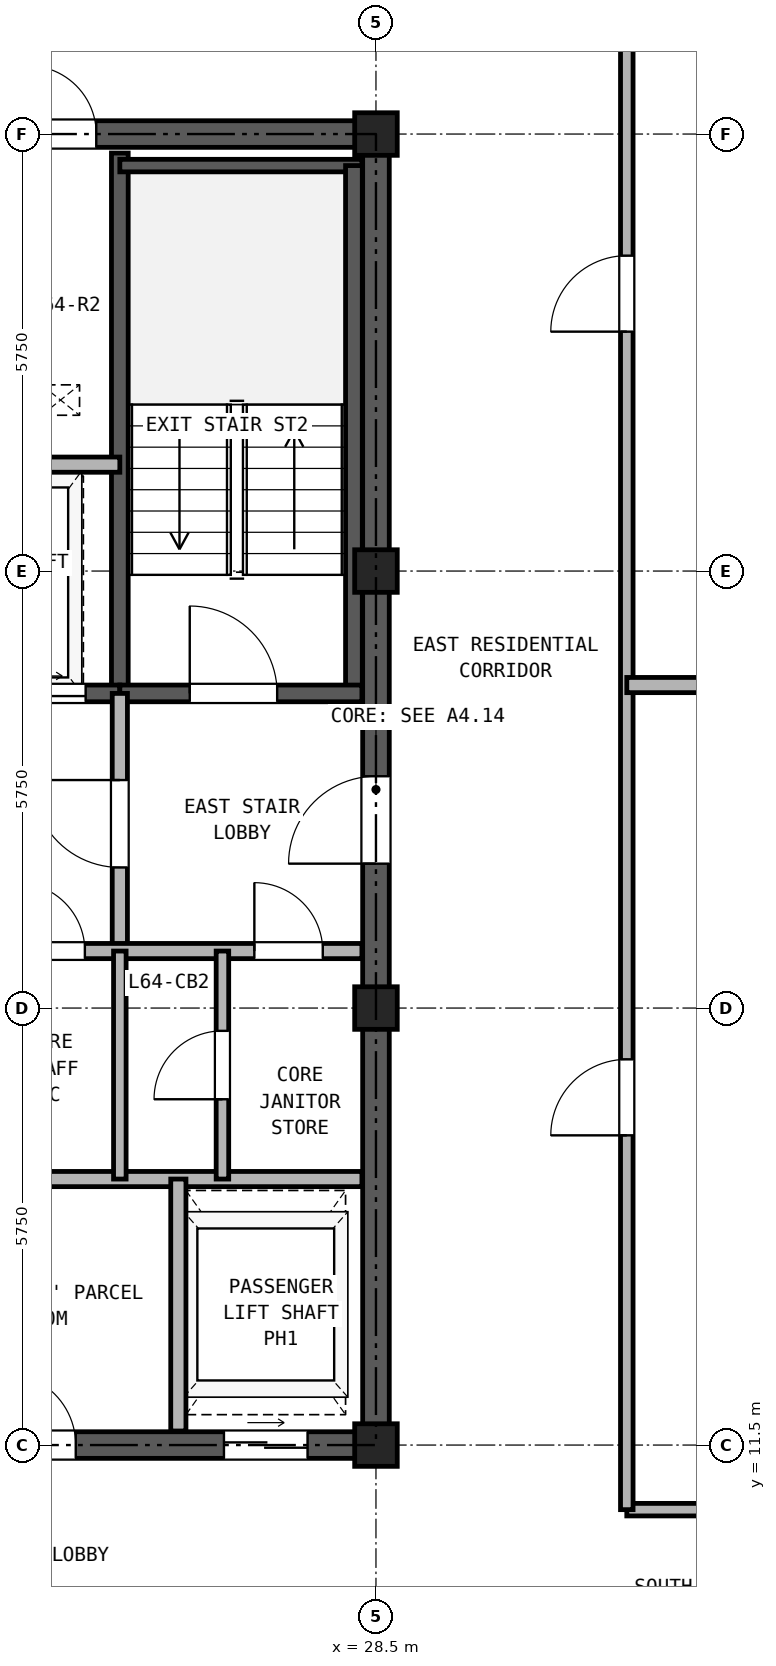
"""IFC4 building model, lengths in metres.
Left out: names, types, materials, properties, quantities, classifications, styles, units other than length and angle.
Written with IfcOpenShell. Run it as: python <this file> out.ifc"""

import sys

from ifc_helpers import new_model, si_unit, direction, frame, frame_2d, origin, origin_2d, place, context, subcontext, project, spatial, rectangle, hollow_rectangle, extrude, source, transform, mapped, element, fill, save


model = new_model("IFC4")
c1 = context("Model", 3, precision=1e-05, world=origin(), true_north=direction((0.0, 1.0)))
c2 = subcontext(c1, "Body", "Model", "MODEL_VIEW")
j1 = project(units=[si_unit("LENGTHUNIT", "METRE"), si_unit("PLANEANGLEUNIT", "RADIAN")], contexts=[c1])
p1 = place(None, origin())
s1 = spatial("IfcSite", under=j1, at=p1, CompositionType="ELEMENT")
p2 = place(p1, origin())
s2 = spatial("IfcBuilding", under=s1, at=p2, CompositionType="ELEMENT")
p3 = place(p2, frame((0.0, 0.0, 226.5)))
s3 = spatial("IfcBuildingStorey", under=s2, at=p3, CompositionType="ELEMENT", Elevation=226.5)
m1 = source(origin(), c2, "Body", "SweptSolid", [
    extrude(hollow_rectangle(XDim=0.56, YDim=0.56, WallThickness=0.03, at=origin_2d()), origin(), (0.0, 0.0, 1.0), 2.98),
])
for number, where, z_axis, x_axis in (
    (1, (28.5, 11.5, 0.0), (0.0, 0.0, 1.0), (1.0, 0.0, 0.0)),
    (2, (28.5, 17.25, 0.0), (0.0, 0.0, 1.0), (1.0, 0.0, 0.0)),
    (3, (28.5, 23.0, 0.0), (0.0, 0.0, 1.0), (1.0, 0.0, 0.0)),
    (4, (28.5, 28.75, 0.0), (0.0, 0.0, 1.0), (1.0, 0.0, 0.0)),
):
    element("IfcColumn", number, at=place(p3, frame(where, z_axis=z_axis, x_axis=x_axis)), inside=s3, PredefinedType="COLUMN", context=c2, shape_type="MappedRepresentation", body=[
        mapped(m1, transform((0.0, 0.0, 0.0), x_axis=(1.0, 0.0, 0.0), y_axis=(0.0, 1.0, 0.0), z_axis=(0.0, 0.0, 1.0), scale=1.0)),
    ])
p4 = place(p3, frame((18.325, 11.5, 0.0), z_axis=(0.0, 0.0, 1.0), x_axis=(1.0, 0.0, 0.0)))
e5 = element("IfcWall", 5, at=p4, inside=s3, PredefinedType="SHEAR", context=c2, shape_type="SweptSolid", body=[
    extrude(rectangle(XDim=10.35, YDim=0.35, at=frame_2d((5.175, 0.0))), origin(), (0.0, 0.0, 1.0), 2.98),
])
p5 = place(p4, frame((1.775, 0.0, 0.0)))
e6 = element("IfcOpeningElement", 6, at=p5, cuts=e5, PredefinedType="OPENING", context=c2, shape_type="SweptSolid", body=[
    extrude(rectangle(XDim=0.95, YDim=2.15, at=frame_2d((0.475, 1.075))), frame((0.0, 0.185, 0.0), z_axis=(0.0, -1.0, 0.0), x_axis=(1.0, 0.0, 0.0)), (0.0, 0.0, 1.0), 0.37),
])
p6 = place(p4, frame((5.275, 0.0, 0.0)))
e7 = element("IfcOpeningElement", 7, at=p6, cuts=e5, PredefinedType="OPENING", context=c2, shape_type="SweptSolid", body=[
    extrude(rectangle(XDim=0.95, YDim=2.15, at=frame_2d((0.475, 1.075))), frame((0.0, 0.185, 0.0), z_axis=(0.0, -1.0, 0.0), x_axis=(1.0, 0.0, 0.0)), (0.0, 0.0, 1.0), 0.37),
])
p7 = place(p4, frame((8.175, 0.0, 0.0)))
e8 = element("IfcOpeningElement", 8, at=p7, cuts=e5, PredefinedType="OPENING", context=c2, shape_type="SweptSolid", body=[
    extrude(rectangle(XDim=1.1, YDim=2.25, at=frame_2d((0.55, 1.125))), frame((0.0, 0.185, 0.0), z_axis=(0.0, -1.0, 0.0), x_axis=(1.0, 0.0, 0.0)), (0.0, 0.0, 1.0), 0.37),
])
p8 = place(p3, frame((18.325, 28.75, 0.0), z_axis=(0.0, 0.0, 1.0), x_axis=(1.0, 0.0, 0.0)))
e9 = element("IfcWall", 9, at=p8, inside=s3, PredefinedType="SHEAR", context=c2, shape_type="SweptSolid", body=[
    extrude(rectangle(XDim=10.35, YDim=0.35, at=frame_2d((5.175, 0.0))), origin(), (0.0, 0.0, 1.0), 2.98),
])
p9 = place(p8, frame((4.055, 0.0, 0.0)))
e10 = element("IfcOpeningElement", 10, at=p9, cuts=e9, PredefinedType="OPENING", context=c2, shape_type="SweptSolid", body=[
    extrude(rectangle(XDim=0.9, YDim=2.05, at=frame_2d((0.45, 1.025))), frame((0.0, 0.185, 0.0), z_axis=(0.0, -1.0, 0.0), x_axis=(1.0, 0.0, 0.0)), (0.0, 0.0, 1.0), 0.37),
])
p10 = place(p8, frame((5.595, 0.0, 0.0)))
e11 = element("IfcOpeningElement", 11, at=p10, cuts=e9, PredefinedType="OPENING", context=c2, shape_type="SweptSolid", body=[
    extrude(rectangle(XDim=0.9, YDim=2.05, at=frame_2d((0.45, 1.025))), frame((0.0, 0.185, 0.0), z_axis=(0.0, -1.0, 0.0), x_axis=(1.0, 0.0, 0.0)), (0.0, 0.0, 1.0), 0.37),
])
p11 = place(p3, frame((28.5, 11.675, 0.0), z_axis=(0.0, 0.0, 1.0), x_axis=(0.0, 1.0, 0.0)))
e12 = element("IfcWall", 12, at=p11, inside=s3, PredefinedType="SHEAR", context=c2, shape_type="SweptSolid", body=[
    extrude(rectangle(XDim=16.9, YDim=0.35, at=frame_2d((8.45, 0.0))), origin(), (0.0, 0.0, 1.0), 2.98),
])
p12 = place(p11, frame((7.475, 0.0, 0.0)))
e13 = element("IfcOpeningElement", 13, at=p12, cuts=e12, PredefinedType="OPENING", context=c2, shape_type="SweptSolid", body=[
    extrude(rectangle(XDim=1.15, YDim=2.2, at=frame_2d((0.575, 1.1))), frame((0.0, 0.185, 0.0), z_axis=(0.0, -1.0, 0.0), x_axis=(1.0, 0.0, 0.0)), (0.0, 0.0, 1.0), 0.37),
])
p13 = place(p3, frame((25.13, 21.39, 0.0), z_axis=(0.0, 0.0, 1.0), x_axis=(0.0, 1.0, 0.0)))
e14 = element("IfcWall", 14, at=p13, inside=s3, PredefinedType="SOLIDWALL", context=c2, shape_type="SweptSolid", body=[
    extrude(rectangle(XDim=7.11, YDim=0.22, at=frame_2d((3.555, 0.0))), origin(), (0.0, 0.0, 1.0), 2.98),
])
p14 = place(p3, frame((25.13, 28.335, 0.0), z_axis=(0.0, 0.0, 1.0), x_axis=(1.0, 0.0, 0.0)))
e15 = element("IfcWall", 15, at=p14, inside=s3, PredefinedType="PARTITIONING", context=c2, shape_type="SweptSolid", body=[
    extrude(rectangle(XDim=3.185, YDim=0.165, at=frame_2d((1.593, 0.0))), origin(), (0.0, 0.0, 1.0), 2.98),
])
p15 = place(p3, frame((28.21, 21.39, 0.0), z_axis=(0.0, 0.0, 1.0), x_axis=(0.0, 1.0, 0.0)))
e16 = element("IfcWall", 16, at=p15, inside=s3, PredefinedType="SOLIDWALL", context=c2, shape_type="SweptSolid", body=[
    extrude(rectangle(XDim=6.945, YDim=0.22, at=frame_2d((3.473, 0.0))), origin(), (0.0, 0.0, 1.0), 2.98),
])
p16 = place(p3, frame((18.685, 21.39, 0.0), z_axis=(0.0, 0.0, 1.0), x_axis=(1.0, 0.0, 0.0)))
e17 = element("IfcWall", 17, at=p16, inside=s3, PredefinedType="SOLIDWALL", context=c2, shape_type="SweptSolid", body=[
    extrude(rectangle(XDim=6.445, YDim=0.22, at=frame_2d((3.222, 0.0))), origin(), (0.0, 0.0, 1.0), 2.98),
])
p17 = place(p16, frame((1.165, 0.0, 0.0)))
e18 = element("IfcOpeningElement", 18, at=p17, cuts=e17, PredefinedType="OPENING", context=c2, shape_type="SweptSolid", body=[
    extrude(rectangle(XDim=1.15, YDim=2.2, at=frame_2d((0.575, 1.1))), frame((0.0, 0.12, 0.0), z_axis=(0.0, -1.0, 0.0), x_axis=(1.0, 0.0, 0.0)), (0.0, 0.0, 1.0), 0.24),
])
p18 = place(p16, frame((4.895, 0.0, 0.0)))
e19 = element("IfcOpeningElement", 19, at=p18, cuts=e17, PredefinedType="OPENING", context=c2, shape_type="SweptSolid", body=[
    extrude(rectangle(XDim=1.1, YDim=2.25, at=frame_2d((0.55, 1.125))), frame((0.0, 0.12, 0.0), z_axis=(0.0, -1.0, 0.0), x_axis=(1.0, 0.0, 0.0)), (0.0, 0.0, 1.0), 0.24),
])
p19 = place(p3, frame((25.13, 21.39, 0.0), z_axis=(0.0, 0.0, 1.0), x_axis=(1.0, 0.0, 0.0)))
e20 = element("IfcWall", 20, at=p19, inside=s3, PredefinedType="SOLIDWALL", context=c2, shape_type="SweptSolid", body=[
    extrude(rectangle(XDim=3.185, YDim=0.22, at=frame_2d((1.593, 0.0))), origin(), (0.0, 0.0, 1.0), 2.98),
])
p20 = place(p19, frame((0.92, 0.0, 0.0)))
e21 = element("IfcOpeningElement", 21, at=p20, cuts=e20, PredefinedType="OPENING", context=c2, shape_type="SweptSolid", body=[
    extrude(rectangle(XDim=1.15, YDim=2.2, at=frame_2d((0.575, 1.1))), frame((0.0, 0.12, 0.0), z_axis=(0.0, -1.0, 0.0), x_axis=(1.0, 0.0, 0.0)), (0.0, 0.0, 1.0), 0.24),
])
p21 = place(p3, frame((22.11, 24.4, 0.0), z_axis=(0.0, 0.0, 1.0), x_axis=(1.0, 0.0, 0.0)))
e22 = element("IfcWall", 22, at=p21, inside=s3, PredefinedType="PARTITIONING", context=c2, shape_type="SweptSolid", body=[
    extrude(rectangle(XDim=3.02, YDim=0.2, at=frame_2d((1.51, 0.0))), origin(), (0.0, 0.0, 1.0), 2.98),
])
p22 = place(p3, frame((25.13, 18.0, 0.0), z_axis=(0.0, 0.0, 1.0), x_axis=(0.0, 1.0, 0.0)))
e23 = element("IfcWall", 23, at=p22, inside=s3, PredefinedType="PARTITIONING", context=c2, shape_type="SweptSolid", body=[
    extrude(rectangle(XDim=3.39, YDim=0.2, at=frame_2d((1.695, 0.0))), origin(), (0.0, 0.0, 1.0), 2.98),
])
p23 = place(p22, frame((1.1, 0.0, 0.0)))
e24 = element("IfcOpeningElement", 24, at=p23, cuts=e23, PredefinedType="OPENING", context=c2, shape_type="SweptSolid", body=[
    extrude(rectangle(XDim=1.15, YDim=2.2, at=frame_2d((0.575, 1.1))), frame((0.0, 0.11, 0.0), z_axis=(0.0, -1.0, 0.0), x_axis=(1.0, 0.0, 0.0)), (0.0, 0.0, 1.0), 0.22),
])
p24 = place(p3, frame((18.685, 18.0, 0.0), z_axis=(0.0, 0.0, 1.0), x_axis=(1.0, 0.0, 0.0)))
e25 = element("IfcWall", 25, at=p24, inside=s3, PredefinedType="PARTITIONING", context=c2, shape_type="SweptSolid", body=[
    extrude(rectangle(XDim=9.63, YDim=0.2, at=frame_2d((4.815, 0.0))), origin(), (0.0, 0.0, 1.0), 2.98),
])
p25 = place(p24, frame((0.565, 0.0, 0.0)))
e26 = element("IfcOpeningElement", 26, at=p25, cuts=e25, PredefinedType="OPENING", context=c2, shape_type="SweptSolid", body=[
    extrude(rectangle(XDim=1.3, YDim=2.3, at=frame_2d((0.65, 1.15))), frame((0.0, 0.11, 0.0), z_axis=(0.0, -1.0, 0.0), x_axis=(1.0, 0.0, 0.0)), (0.0, 0.0, 1.0), 0.22),
])
p26 = place(p24, frame((2.665, 0.0, 0.0)))
e27 = element("IfcOpeningElement", 27, at=p26, cuts=e25, PredefinedType="OPENING", context=c2, shape_type="SweptSolid", body=[
    extrude(rectangle(XDim=1.3, YDim=2.3, at=frame_2d((0.65, 1.15))), frame((0.0, 0.11, 0.0), z_axis=(0.0, -1.0, 0.0), x_axis=(1.0, 0.0, 0.0)), (0.0, 0.0, 1.0), 0.22),
])
p27 = place(p24, frame((5.085, 0.0, 0.0)))
e28 = element("IfcOpeningElement", 28, at=p27, cuts=e25, PredefinedType="OPENING", context=c2, shape_type="SweptSolid", body=[
    extrude(rectangle(XDim=0.9, YDim=2.05, at=frame_2d((0.45, 1.025))), frame((0.0, 0.11, 0.0), z_axis=(0.0, -1.0, 0.0), x_axis=(1.0, 0.0, 0.0)), (0.0, 0.0, 1.0), 0.22),
])
p28 = place(p24, frame((8.215, 0.0, 0.0)))
e29 = element("IfcOpeningElement", 29, at=p28, cuts=e25, PredefinedType="OPENING", context=c2, shape_type="SweptSolid", body=[
    extrude(rectangle(XDim=0.9, YDim=2.05, at=frame_2d((0.45, 1.025))), frame((0.0, 0.11, 0.0), z_axis=(0.0, -1.0, 0.0), x_axis=(1.0, 0.0, 0.0)), (0.0, 0.0, 1.0), 0.22),
])
p29 = place(p3, frame((18.685, 15.0, 0.0), z_axis=(0.0, 0.0, 1.0), x_axis=(1.0, 0.0, 0.0)))
e30 = element("IfcWall", 30, at=p29, inside=s3, PredefinedType="PARTITIONING", context=c2, shape_type="SweptSolid", body=[
    extrude(rectangle(XDim=9.63, YDim=0.2, at=frame_2d((4.815, 0.0))), origin(), (0.0, 0.0, 1.0), 2.98),
])
p30 = place(p3, frame((25.13, 15.0, 0.0), z_axis=(0.0, 0.0, 1.0), x_axis=(0.0, 1.0, 0.0)))
e31 = element("IfcWall", 31, at=p30, inside=s3, PredefinedType="PARTITIONING", context=c2, shape_type="SweptSolid", body=[
    extrude(rectangle(XDim=3.0, YDim=0.165, at=frame_2d((1.5, 0.0))), origin(), (0.0, 0.0, 1.0), 2.98),
])
p31 = place(p3, frame((26.48, 15.0, 0.0), z_axis=(0.0, 0.0, 1.0), x_axis=(0.0, 1.0, 0.0)))
e32 = element("IfcWall", 32, at=p31, inside=s3, PredefinedType="PARTITIONING", context=c2, shape_type="SweptSolid", body=[
    extrude(rectangle(XDim=3.0, YDim=0.165, at=frame_2d((1.5, 0.0))), origin(), (0.0, 0.0, 1.0), 2.98),
])
p32 = place(p31, frame((1.05, 0.0, 0.0)))
e33 = element("IfcOpeningElement", 33, at=p32, cuts=e32, PredefinedType="OPENING", context=c2, shape_type="SweptSolid", body=[
    extrude(rectangle(XDim=0.9, YDim=2.05, at=frame_2d((0.45, 1.025))), frame((0.0, 0.093, 0.0), z_axis=(0.0, -1.0, 0.0), x_axis=(1.0, 0.0, 0.0)), (0.0, 0.0, 1.0), 0.185),
])
p33 = place(p3, frame((25.9, 11.685, 0.0), z_axis=(0.0, 0.0, 1.0), x_axis=(0.0, 1.0, 0.0)))
e34 = element("IfcWall", 34, at=p33, inside=s3, PredefinedType="PARTITIONING", context=c2, shape_type="SweptSolid", body=[
    extrude(rectangle(XDim=3.315, YDim=0.2, at=frame_2d((1.657, 0.0))), origin(), (0.0, 0.0, 1.0), 2.98),
])
p34 = place(p3, frame((31.8, 10.65, 0.0), z_axis=(0.0, 0.0, 1.0), x_axis=(1.0, 0.0, 0.0)))
e35 = element("IfcWall", 35, at=p34, inside=s3, PredefinedType="PARTITIONING", context=c2, shape_type="SweptSolid", body=[
    extrude(rectangle(XDim=6.4, YDim=0.165, at=frame_2d((3.2, 0.0))), origin(), (0.0, 0.0, 1.0), 2.98),
])
p35 = place(p3, frame((31.8, 10.65, 0.0), z_axis=(0.0, 0.0, 1.0), x_axis=(0.0, 1.0, 0.0)))
e36 = element("IfcWall", 36, at=p35, inside=s3, PredefinedType="PARTITIONING", context=c2, shape_type="SweptSolid", body=[
    extrude(rectangle(XDim=24.49, YDim=0.165, at=frame_2d((12.245, 0.0))), origin(), (0.0, 0.0, 1.0), 2.98),
])
p36 = place(p35, frame((4.925, 0.0, 0.0)))
e37 = element("IfcOpeningElement", 37, at=p36, cuts=e36, PredefinedType="OPENING", context=c2, shape_type="SweptSolid", body=[
    extrude(rectangle(XDim=1.0, YDim=2.15, at=frame_2d((0.5, 1.075))), frame((0.0, 0.093, 0.0), z_axis=(0.0, -1.0, 0.0), x_axis=(1.0, 0.0, 0.0)), (0.0, 0.0, 1.0), 0.185),
])
p37 = place(p35, frame((15.5, 0.0, 0.0)))
e38 = element("IfcOpeningElement", 38, at=p37, cuts=e36, PredefinedType="OPENING", context=c2, shape_type="SweptSolid", body=[
    extrude(rectangle(XDim=1.0, YDim=2.15, at=frame_2d((0.5, 1.075))), frame((0.0, 0.093, 0.0), z_axis=(0.0, -1.0, 0.0), x_axis=(1.0, 0.0, 0.0)), (0.0, 0.0, 1.0), 0.185),
])
p38 = place(p3, frame((31.8, 21.5, 0.0), z_axis=(0.0, 0.0, 1.0), x_axis=(1.0, 0.0, 0.0)))
e39 = element("IfcWall", 39, at=p38, inside=s3, PredefinedType="PARTITIONING", context=c2, shape_type="SweptSolid", body=[
    extrude(rectangle(XDim=9.84, YDim=0.2, at=frame_2d((4.92, 0.0))), origin(), (0.0, 0.0, 1.0), 2.98),
])
p39 = place(p20, frame((1.15, 0.0, 0.0), z_axis=(0.0, 0.0, 1.0), x_axis=(-1.0, 0.0, 0.0)))
e40 = element("IfcDoor", 40, at=p39, inside=s3, OperationType="SINGLE_SWING_LEFT", PredefinedType="DOOR", context=c2, shape_type="SweptSolid", body=[
    extrude(rectangle(XDim=1.15, YDim=2.2, at=frame_2d((0.575, 1.1))), frame((0.0, 0.025, 0.0), z_axis=(0.0, -1.0, 0.0), x_axis=(1.0, 0.0, 0.0)), (0.0, 0.0, 1.0), 0.05),
])
fill(e21, e40)
p40 = place(p18, frame((1.1, 0.0, 0.0), z_axis=(0.0, 0.0, 1.0), x_axis=(-1.0, 0.0, 0.0)))
e41 = element("IfcDoor", 41, at=p40, inside=s3, OperationType="DOUBLE_DOOR_SLIDING", PredefinedType="DOOR", context=c2, shape_type="SweptSolid", body=[
    extrude(rectangle(XDim=1.1, YDim=2.25, at=frame_2d((0.55, 1.125))), frame((0.0, 0.025, 0.0), z_axis=(0.0, -1.0, 0.0), x_axis=(1.0, 0.0, 0.0)), (0.0, 0.0, 1.0), 0.05),
])
fill(e19, e41)
p41 = place(p23, origin())
e42 = element("IfcDoor", 42, at=p41, inside=s3, OperationType="SINGLE_SWING_RIGHT", PredefinedType="DOOR", context=c2, shape_type="SweptSolid", body=[
    extrude(rectangle(XDim=1.15, YDim=2.2, at=frame_2d((0.575, 1.1))), frame((0.0, 0.025, 0.0), z_axis=(0.0, -1.0, 0.0), x_axis=(1.0, 0.0, 0.0)), (0.0, 0.0, 1.0), 0.05),
])
fill(e24, e42)
p42 = place(p27, frame((0.9, 0.0, 0.0), z_axis=(0.0, 0.0, 1.0), x_axis=(-1.0, 0.0, 0.0)))
e43 = element("IfcDoor", 43, at=p42, inside=s3, OperationType="SINGLE_SWING_LEFT", PredefinedType="DOOR", context=c2, shape_type="SweptSolid", body=[
    extrude(rectangle(XDim=0.9, YDim=2.05, at=frame_2d((0.45, 1.025))), frame((0.0, 0.025, 0.0), z_axis=(0.0, -1.0, 0.0), x_axis=(1.0, 0.0, 0.0)), (0.0, 0.0, 1.0), 0.05),
])
fill(e28, e43)
p43 = place(p32, origin())
e44 = element("IfcDoor", 44, at=p43, inside=s3, OperationType="SINGLE_SWING_LEFT", PredefinedType="DOOR", context=c2, shape_type="SweptSolid", body=[
    extrude(rectangle(XDim=0.9, YDim=2.05, at=frame_2d((0.45, 1.025))), frame((0.0, 0.025, 0.0), z_axis=(0.0, -1.0, 0.0), x_axis=(1.0, 0.0, 0.0)), (0.0, 0.0, 1.0), 0.05),
])
fill(e33, e44)
p44 = place(p28, frame((0.9, 0.0, 0.0), z_axis=(0.0, 0.0, 1.0), x_axis=(-1.0, 0.0, 0.0)))
e45 = element("IfcDoor", 45, at=p44, inside=s3, OperationType="SINGLE_SWING_LEFT", PredefinedType="DOOR", context=c2, shape_type="SweptSolid", body=[
    extrude(rectangle(XDim=0.9, YDim=2.05, at=frame_2d((0.45, 1.025))), frame((0.0, 0.025, 0.0), z_axis=(0.0, -1.0, 0.0), x_axis=(1.0, 0.0, 0.0)), (0.0, 0.0, 1.0), 0.05),
])
fill(e29, e45)
p45 = place(p12, origin())
e46 = element("IfcDoor", 46, at=p45, inside=s3, OperationType="SINGLE_SWING_LEFT", PredefinedType="DOOR", context=c2, shape_type="SweptSolid", body=[
    extrude(rectangle(XDim=1.15, YDim=2.2, at=frame_2d((0.575, 1.1))), frame((0.0, 0.025, 0.0), z_axis=(0.0, -1.0, 0.0), x_axis=(1.0, 0.0, 0.0)), (0.0, 0.0, 1.0), 0.05),
])
fill(e13, e46)
p46 = place(p10, origin())
e47 = element("IfcDoor", 47, at=p46, inside=s3, OperationType="SINGLE_SWING_LEFT", PredefinedType="DOOR", context=c2, shape_type="SweptSolid", body=[
    extrude(rectangle(XDim=0.9, YDim=2.05, at=frame_2d((0.45, 1.025))), frame((0.0, 0.025, 0.0), z_axis=(0.0, -1.0, 0.0), x_axis=(1.0, 0.0, 0.0)), (0.0, 0.0, 1.0), 0.05),
])
fill(e11, e47)
p47 = place(p6, frame((0.95, 0.0, 0.0), z_axis=(0.0, 0.0, 1.0), x_axis=(-1.0, 0.0, 0.0)))
e48 = element("IfcDoor", 48, at=p47, inside=s3, OperationType="SINGLE_SWING_LEFT", PredefinedType="DOOR", context=c2, shape_type="SweptSolid", body=[
    extrude(rectangle(XDim=0.95, YDim=2.15, at=frame_2d((0.475, 1.075))), frame((0.0, 0.025, 0.0), z_axis=(0.0, -1.0, 0.0), x_axis=(1.0, 0.0, 0.0)), (0.0, 0.0, 1.0), 0.05),
])
fill(e7, e48)
p48 = place(p7, frame((1.1, 0.0, 0.0), z_axis=(0.0, 0.0, 1.0), x_axis=(-1.0, 0.0, 0.0)))
e49 = element("IfcDoor", 49, at=p48, inside=s3, OperationType="DOUBLE_DOOR_SLIDING", PredefinedType="DOOR", context=c2, shape_type="SweptSolid", body=[
    extrude(rectangle(XDim=1.1, YDim=2.25, at=frame_2d((0.55, 1.125))), frame((0.0, 0.025, 0.0), z_axis=(0.0, -1.0, 0.0), x_axis=(1.0, 0.0, 0.0)), (0.0, 0.0, 1.0), 0.05),
])
fill(e8, e49)
p49 = place(p36, frame((1.0, 0.0, 0.0), z_axis=(0.0, 0.0, 1.0), x_axis=(-1.0, 0.0, 0.0)))
e50 = element("IfcDoor", 50, at=p49, inside=s3, OperationType="SINGLE_SWING_LEFT", PredefinedType="DOOR", context=c2, shape_type="SweptSolid", body=[
    extrude(rectangle(XDim=1.0, YDim=2.15, at=frame_2d((0.5, 1.075))), frame((0.0, 0.025, 0.0), z_axis=(0.0, -1.0, 0.0), x_axis=(1.0, 0.0, 0.0)), (0.0, 0.0, 1.0), 0.05),
])
fill(e37, e50)
p50 = place(p37, frame((1.0, 0.0, 0.0), z_axis=(0.0, 0.0, 1.0), x_axis=(-1.0, 0.0, 0.0)))
e51 = element("IfcDoor", 51, at=p50, inside=s3, OperationType="SINGLE_SWING_LEFT", PredefinedType="DOOR", context=c2, shape_type="SweptSolid", body=[
    extrude(rectangle(XDim=1.0, YDim=2.15, at=frame_2d((0.5, 1.075))), frame((0.0, 0.025, 0.0), z_axis=(0.0, -1.0, 0.0), x_axis=(1.0, 0.0, 0.0)), (0.0, 0.0, 1.0), 0.05),
])
fill(e38, e51)
save(model, sys.argv[1])
